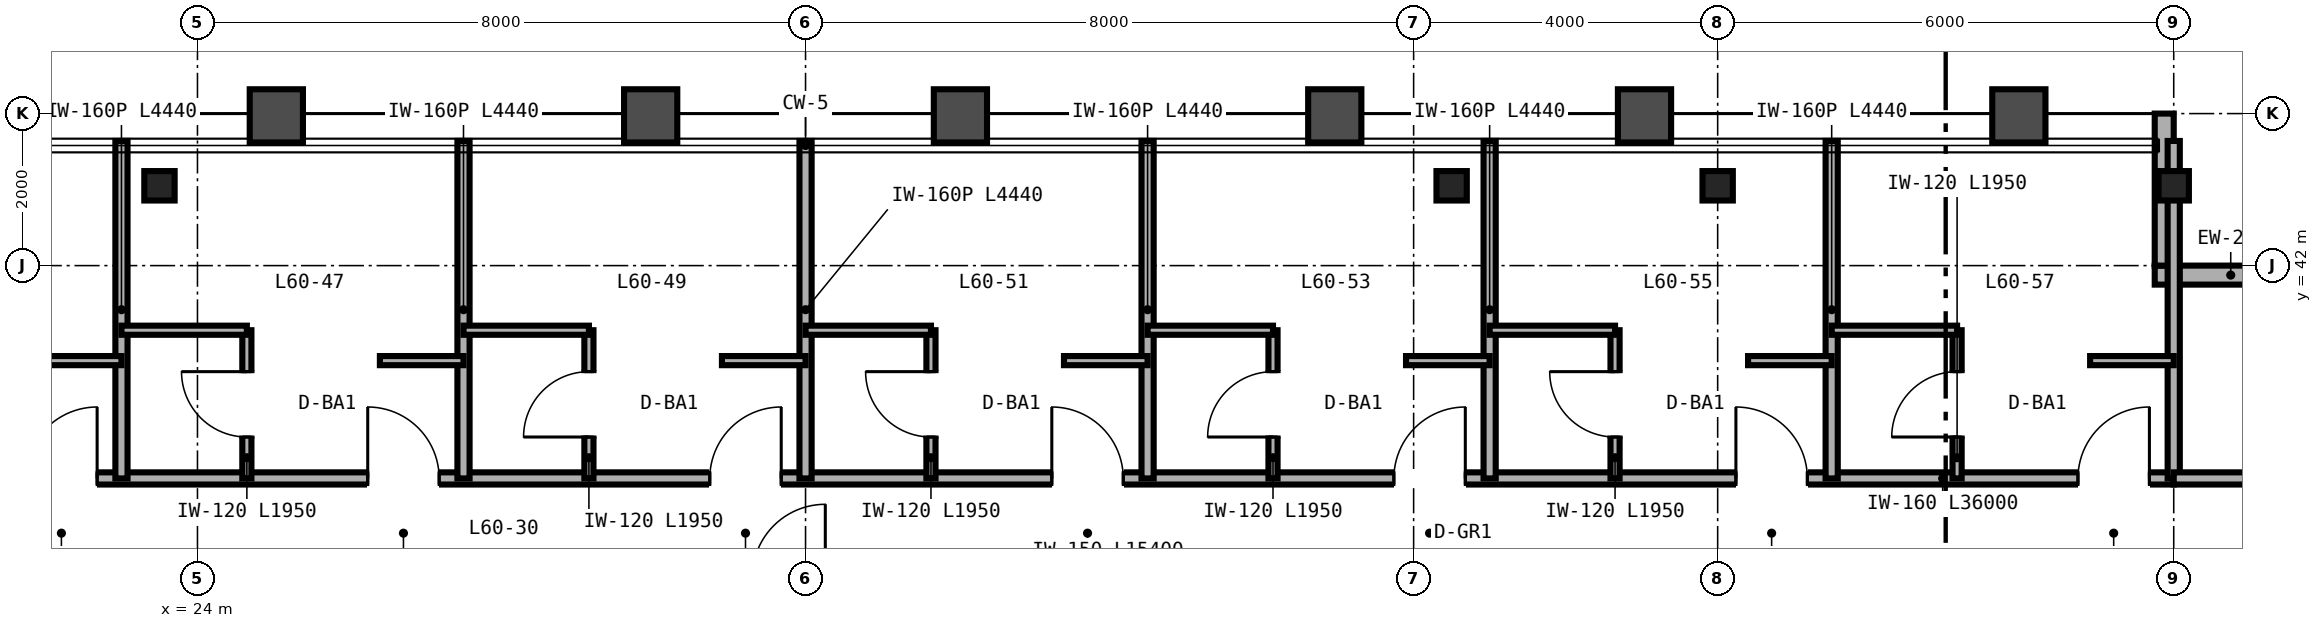
"""IFC4 building model, lengths in metres.
Left out: names, types, materials, properties, quantities, classifications, styles, units other than length and angle.
Written with IfcOpenShell. Run it as: python <this file> out.ifc"""

import sys

from ifc_helpers import new_model, si_unit, direction, frame, frame_2d, origin, origin_2d, place, context, subcontext, project, spatial, rectangle, i_section, extrude, source, transform, mapped, element, fill, save


model = new_model("IFC4")
c1 = context("Model", 3, precision=1e-05, world=origin(), true_north=direction((0.0, 1.0)))
c2 = subcontext(c1, "Body", "Model", "MODEL_VIEW")
j1 = project(units=[si_unit("LENGTHUNIT", "METRE"), si_unit("PLANEANGLEUNIT", "RADIAN")], contexts=[c1])
p1 = place(None, origin())
s1 = spatial("IfcSite", under=j1, at=p1, CompositionType="ELEMENT")
p2 = place(p1, origin())
s2 = spatial("IfcBuilding", under=s1, at=p2, CompositionType="ELEMENT")
p3 = place(p2, frame((0.0, 0.0, 240.0)))
s3 = spatial("IfcBuildingStorey", under=s2, at=p3, CompositionType="ELEMENT", Elevation=240.0)
m1 = source(origin(), c2, "Body", "SweptSolid", [
    extrude(i_section(OverallWidth=0.399, OverallDepth=0.387, WebThickness=0.021, FlangeThickness=0.033, FilletRadius=0.025, at=origin_2d()), origin(), (0.0, 0.0, 1.0), 3.38),
])
for number, where, z_axis, x_axis in (
    (1, (23.5, 43.05, 0.0), (0.0, 0.0, 1.0), (1.0, 0.0, 0.0)),
    (2, (40.5, 43.05, 0.0), (0.0, 0.0, 1.0), (1.0, 0.0, 0.0)),
    (3, (44.0, 43.05, 0.0), (0.0, 0.0, 1.0), (1.0, 0.0, 0.0)),
    (4, (50.0, 43.05, 0.0), (0.0, 0.0, 1.0), (1.0, 0.0, 0.0)),
):
    element("IfcColumn", number, at=place(p3, frame(where, z_axis=z_axis, x_axis=x_axis)), inside=s3, PredefinedType="COLUMN", context=c2, shape_type="MappedRepresentation", body=[
        mapped(m1, transform((0.0, 0.0, 0.0), scale=1.0)),
    ])
p4 = place(p3, frame((51.75, 41.875, 0.0), z_axis=(0.0, 0.0, 1.0), x_axis=(-1.0, 0.0, 0.0)))
e5 = element("IfcWall", 5, at=p4, inside=s3, PredefinedType="SOLIDWALL", context=c2, shape_type="SweptSolid", body=[
    extrude(rectangle(XDim=2.0, YDim=0.25, at=frame_2d((1.0, 0.0))), origin(), (0.0, 0.0, 1.0), 3.38),
])
p5 = place(p3, frame((49.875, 42.0, 0.0), z_axis=(0.0, 0.0, 1.0), x_axis=(0.0, 1.0, 0.0)))
e6 = element("IfcWall", 6, at=p5, inside=s3, PredefinedType="SOLIDWALL", context=c2, shape_type="SweptSolid", body=[
    extrude(rectangle(XDim=2.0, YDim=0.25, at=frame_2d((1.0, 0.0))), origin(), (0.0, 0.0, 1.0), 2.687),
])
p6 = place(p3, frame((14.0, 39.2, 0.0), z_axis=(0.0, 0.0, 1.0), x_axis=(1.0, 0.0, 0.0)))
e7 = element("IfcWall", 7, at=p6, inside=s3, PredefinedType="PARTITIONING", context=c2, shape_type="SweptSolid", body=[
    extrude(rectangle(XDim=36.0, YDim=0.16, at=frame_2d((18.0, 0.0))), origin(), (0.0, 0.0, 1.0), 2.923),
])
p7 = place(p6, frame((3.24, 0.0, 0.0)))
e8 = element("IfcOpeningElement", 8, at=p7, cuts=e7, PredefinedType="OPENING", context=c2, shape_type="SweptSolid", body=[
    extrude(rectangle(XDim=0.94, YDim=2.15, at=frame_2d((0.47, 1.075))), frame((0.0, 0.09, 0.0), z_axis=(0.0, -1.0, 0.0), x_axis=(1.0, 0.0, 0.0)), (0.0, 0.0, 1.0), 0.18),
])
p8 = place(p6, frame((7.74, 0.0, 0.0)))
e9 = element("IfcOpeningElement", 9, at=p8, cuts=e7, PredefinedType="OPENING", context=c2, shape_type="SweptSolid", body=[
    extrude(rectangle(XDim=0.94, YDim=2.15, at=frame_2d((0.47, 1.075))), frame((0.0, 0.09, 0.0), z_axis=(0.0, -1.0, 0.0), x_axis=(1.0, 0.0, 0.0)), (0.0, 0.0, 1.0), 0.18),
])
p9 = place(p6, frame((12.24, 0.0, 0.0)))
e10 = element("IfcOpeningElement", 10, at=p9, cuts=e7, PredefinedType="OPENING", context=c2, shape_type="SweptSolid", body=[
    extrude(rectangle(XDim=0.94, YDim=2.15, at=frame_2d((0.47, 1.075))), frame((0.0, 0.09, 0.0), z_axis=(0.0, -1.0, 0.0), x_axis=(1.0, 0.0, 0.0)), (0.0, 0.0, 1.0), 0.18),
])
p10 = place(p6, frame((16.74, 0.0, 0.0)))
e11 = element("IfcOpeningElement", 11, at=p10, cuts=e7, PredefinedType="OPENING", context=c2, shape_type="SweptSolid", body=[
    extrude(rectangle(XDim=0.94, YDim=2.15, at=frame_2d((0.47, 1.075))), frame((0.0, 0.09, 0.0), z_axis=(0.0, -1.0, 0.0), x_axis=(1.0, 0.0, 0.0)), (0.0, 0.0, 1.0), 0.18),
])
p11 = place(p6, frame((21.24, 0.0, 0.0)))
e12 = element("IfcOpeningElement", 12, at=p11, cuts=e7, PredefinedType="OPENING", context=c2, shape_type="SweptSolid", body=[
    extrude(rectangle(XDim=0.94, YDim=2.15, at=frame_2d((0.47, 1.075))), frame((0.0, 0.09, 0.0), z_axis=(0.0, -1.0, 0.0), x_axis=(1.0, 0.0, 0.0)), (0.0, 0.0, 1.0), 0.18),
])
p12 = place(p6, frame((25.74, 0.0, 0.0)))
e13 = element("IfcOpeningElement", 13, at=p12, cuts=e7, PredefinedType="OPENING", context=c2, shape_type="SweptSolid", body=[
    extrude(rectangle(XDim=0.94, YDim=2.15, at=frame_2d((0.47, 1.075))), frame((0.0, 0.09, 0.0), z_axis=(0.0, -1.0, 0.0), x_axis=(1.0, 0.0, 0.0)), (0.0, 0.0, 1.0), 0.18),
])
p13 = place(p6, frame((30.24, 0.0, 0.0)))
e14 = element("IfcOpeningElement", 14, at=p13, cuts=e7, PredefinedType="OPENING", context=c2, shape_type="SweptSolid", body=[
    extrude(rectangle(XDim=0.94, YDim=2.15, at=frame_2d((0.47, 1.075))), frame((0.0, 0.09, 0.0), z_axis=(0.0, -1.0, 0.0), x_axis=(1.0, 0.0, 0.0)), (0.0, 0.0, 1.0), 0.18),
])
p14 = place(p6, frame((34.74, 0.0, 0.0)))
e15 = element("IfcOpeningElement", 15, at=p14, cuts=e7, PredefinedType="OPENING", context=c2, shape_type="SweptSolid", body=[
    extrude(rectangle(XDim=0.94, YDim=2.15, at=frame_2d((0.47, 1.075))), frame((0.0, 0.09, 0.0), z_axis=(0.0, -1.0, 0.0), x_axis=(1.0, 0.0, 0.0)), (0.0, 0.0, 1.0), 0.18),
])
p15 = place(p3, frame((50.0, 39.2, 0.0), z_axis=(0.0, 0.0, 1.0), x_axis=(0.0, 1.0, 0.0)))
e16 = element("IfcWall", 16, at=p15, inside=s3, PredefinedType="PARTITIONING", context=c2, shape_type="SweptSolid", body=[
    extrude(rectangle(XDim=4.44, YDim=0.16, at=frame_2d((2.22, 0.0))), origin(), (0.0, 0.0, 1.0), 2.687),
])
p16 = place(p3, frame((23.0, 39.2, 0.0), z_axis=(0.0, 0.0, 1.0), x_axis=(0.0, 1.0, 0.0)))
e17 = element("IfcWall", 17, at=p16, inside=s3, PredefinedType="PARTITIONING", context=c2, shape_type="SweptSolid", body=[
    extrude(rectangle(XDim=4.44, YDim=0.16, at=frame_2d((2.22, 0.0))), origin(), (0.0, 0.0, 1.0), 2.843),
])
p17 = place(p3, frame((21.9, 40.75, 0.0), z_axis=(0.0, 0.0, 1.0), x_axis=(1.0, 0.0, 0.0)))
e18 = element("IfcWall", 18, at=p17, inside=s3, PredefinedType="PARTITIONING", context=c2, shape_type="SweptSolid", body=[
    extrude(rectangle(XDim=1.1, YDim=0.12, at=frame_2d((0.55, 0.0))), origin(), (0.0, 0.0, 1.0), 3.38),
])
p18 = place(p3, frame((27.5, 39.2, 0.0), z_axis=(0.0, 0.0, 1.0), x_axis=(0.0, 1.0, 0.0)))
e19 = element("IfcWall", 19, at=p18, inside=s3, PredefinedType="PARTITIONING", context=c2, shape_type="SweptSolid", body=[
    extrude(rectangle(XDim=4.44, YDim=0.16, at=frame_2d((2.22, 0.0))), origin(), (0.0, 0.0, 1.0), 2.453),
])
p19 = place(p3, frame((24.65, 39.2, 0.0), z_axis=(0.0, 0.0, 1.0), x_axis=(0.0, 1.0, 0.0)))
e20 = element("IfcWall", 20, at=p19, inside=s3, PredefinedType="PARTITIONING", context=c2, shape_type="SweptSolid", body=[
    extrude(rectangle(XDim=1.95, YDim=0.12, at=frame_2d((0.975, 0.0))), origin(), (0.0, 0.0, 1.0), 3.38),
])
p20 = place(p19, frame((0.545, 0.0, 0.0)))
e21 = element("IfcOpeningElement", 21, at=p20, cuts=e20, PredefinedType="OPENING", context=c2, shape_type="SweptSolid", body=[
    extrude(rectangle(XDim=0.86, YDim=2.1, at=frame_2d((0.43, 1.05))), frame((0.0, 0.07, 0.0), z_axis=(0.0, -1.0, 0.0), x_axis=(1.0, 0.0, 0.0)), (0.0, 0.0, 1.0), 0.14),
])
p21 = place(p3, frame((23.0, 41.15, 0.0), z_axis=(0.0, 0.0, 1.0), x_axis=(1.0, 0.0, 0.0)))
e22 = element("IfcWall", 22, at=p21, inside=s3, PredefinedType="PARTITIONING", context=c2, shape_type="SweptSolid", body=[
    extrude(rectangle(XDim=1.65, YDim=0.12, at=frame_2d((0.825, 0.0))), origin(), (0.0, 0.0, 1.0), 2.923),
])
p22 = place(p3, frame((26.4, 40.75, 0.0), z_axis=(0.0, 0.0, 1.0), x_axis=(1.0, 0.0, 0.0)))
e23 = element("IfcWall", 23, at=p22, inside=s3, PredefinedType="PARTITIONING", context=c2, shape_type="SweptSolid", body=[
    extrude(rectangle(XDim=1.1, YDim=0.12, at=frame_2d((0.55, 0.0))), origin(), (0.0, 0.0, 1.0), 3.38),
])
p23 = place(p3, frame((32.0, 39.2, 0.0), z_axis=(0.0, 0.0, 1.0), x_axis=(0.0, 1.0, 0.0)))
e24 = element("IfcWall", 24, at=p23, inside=s3, PredefinedType="PARTITIONING", context=c2, shape_type="SweptSolid", body=[
    extrude(rectangle(XDim=4.44, YDim=0.16, at=frame_2d((2.22, 0.0))), origin(), (0.0, 0.0, 1.0), 2.453),
])
p24 = place(p3, frame((29.15, 39.2, 0.0), z_axis=(0.0, 0.0, 1.0), x_axis=(0.0, 1.0, 0.0)))
e25 = element("IfcWall", 25, at=p24, inside=s3, PredefinedType="PARTITIONING", context=c2, shape_type="SweptSolid", body=[
    extrude(rectangle(XDim=1.95, YDim=0.12, at=frame_2d((0.975, 0.0))), origin(), (0.0, 0.0, 1.0), 3.38),
])
p25 = place(p24, frame((0.545, 0.0, 0.0)))
e26 = element("IfcOpeningElement", 26, at=p25, cuts=e25, PredefinedType="OPENING", context=c2, shape_type="SweptSolid", body=[
    extrude(rectangle(XDim=0.86, YDim=2.1, at=frame_2d((0.43, 1.05))), frame((0.0, 0.07, 0.0), z_axis=(0.0, -1.0, 0.0), x_axis=(1.0, 0.0, 0.0)), (0.0, 0.0, 1.0), 0.14),
])
p26 = place(p3, frame((27.5, 41.15, 0.0), z_axis=(0.0, 0.0, 1.0), x_axis=(1.0, 0.0, 0.0)))
e27 = element("IfcWall", 27, at=p26, inside=s3, PredefinedType="PARTITIONING", context=c2, shape_type="SweptSolid", body=[
    extrude(rectangle(XDim=1.65, YDim=0.12, at=frame_2d((0.825, 0.0))), origin(), (0.0, 0.0, 1.0), 3.38),
])
p27 = place(p3, frame((30.9, 40.75, 0.0), z_axis=(0.0, 0.0, 1.0), x_axis=(1.0, 0.0, 0.0)))
e28 = element("IfcWall", 28, at=p27, inside=s3, PredefinedType="PARTITIONING", context=c2, shape_type="SweptSolid", body=[
    extrude(rectangle(XDim=1.1, YDim=0.12, at=frame_2d((0.55, 0.0))), origin(), (0.0, 0.0, 1.0), 3.38),
])
p28 = place(p3, frame((36.5, 39.2, 0.0), z_axis=(0.0, 0.0, 1.0), x_axis=(0.0, 1.0, 0.0)))
e29 = element("IfcWall", 29, at=p28, inside=s3, PredefinedType="PARTITIONING", context=c2, shape_type="SweptSolid", body=[
    extrude(rectangle(XDim=4.44, YDim=0.16, at=frame_2d((2.22, 0.0))), origin(), (0.0, 0.0, 1.0), 2.453),
])
p29 = place(p3, frame((33.65, 39.2, 0.0), z_axis=(0.0, 0.0, 1.0), x_axis=(0.0, 1.0, 0.0)))
e30 = element("IfcWall", 30, at=p29, inside=s3, PredefinedType="PARTITIONING", context=c2, shape_type="SweptSolid", body=[
    extrude(rectangle(XDim=1.95, YDim=0.12, at=frame_2d((0.975, 0.0))), origin(), (0.0, 0.0, 1.0), 3.38),
])
p30 = place(p29, frame((0.545, 0.0, 0.0)))
e31 = element("IfcOpeningElement", 31, at=p30, cuts=e30, PredefinedType="OPENING", context=c2, shape_type="SweptSolid", body=[
    extrude(rectangle(XDim=0.86, YDim=2.1, at=frame_2d((0.43, 1.05))), frame((0.0, 0.07, 0.0), z_axis=(0.0, -1.0, 0.0), x_axis=(1.0, 0.0, 0.0)), (0.0, 0.0, 1.0), 0.14),
])
p31 = place(p3, frame((32.0, 41.15, 0.0), z_axis=(0.0, 0.0, 1.0), x_axis=(1.0, 0.0, 0.0)))
e32 = element("IfcWall", 32, at=p31, inside=s3, PredefinedType="PARTITIONING", context=c2, shape_type="SweptSolid", body=[
    extrude(rectangle(XDim=1.65, YDim=0.12, at=frame_2d((0.825, 0.0))), origin(), (0.0, 0.0, 1.0), 3.38),
])
p32 = place(p3, frame((35.4, 40.75, 0.0), z_axis=(0.0, 0.0, 1.0), x_axis=(1.0, 0.0, 0.0)))
e33 = element("IfcWall", 33, at=p32, inside=s3, PredefinedType="PARTITIONING", context=c2, shape_type="SweptSolid", body=[
    extrude(rectangle(XDim=1.1, YDim=0.12, at=frame_2d((0.55, 0.0))), origin(), (0.0, 0.0, 1.0), 3.38),
])
p33 = place(p3, frame((41.0, 39.2, 0.0), z_axis=(0.0, 0.0, 1.0), x_axis=(0.0, 1.0, 0.0)))
e34 = element("IfcWall", 34, at=p33, inside=s3, PredefinedType="PARTITIONING", context=c2, shape_type="SweptSolid", body=[
    extrude(rectangle(XDim=4.44, YDim=0.16, at=frame_2d((2.22, 0.0))), origin(), (0.0, 0.0, 1.0), 2.843),
])
p34 = place(p3, frame((38.15, 39.2, 0.0), z_axis=(0.0, 0.0, 1.0), x_axis=(0.0, 1.0, 0.0)))
e35 = element("IfcWall", 35, at=p34, inside=s3, PredefinedType="PARTITIONING", context=c2, shape_type="SweptSolid", body=[
    extrude(rectangle(XDim=1.95, YDim=0.12, at=frame_2d((0.975, 0.0))), origin(), (0.0, 0.0, 1.0), 3.38),
])
p35 = place(p34, frame((0.545, 0.0, 0.0)))
e36 = element("IfcOpeningElement", 36, at=p35, cuts=e35, PredefinedType="OPENING", context=c2, shape_type="SweptSolid", body=[
    extrude(rectangle(XDim=0.86, YDim=2.1, at=frame_2d((0.43, 1.05))), frame((0.0, 0.07, 0.0), z_axis=(0.0, -1.0, 0.0), x_axis=(1.0, 0.0, 0.0)), (0.0, 0.0, 1.0), 0.14),
])
p36 = place(p3, frame((36.5, 41.15, 0.0), z_axis=(0.0, 0.0, 1.0), x_axis=(1.0, 0.0, 0.0)))
e37 = element("IfcWall", 37, at=p36, inside=s3, PredefinedType="PARTITIONING", context=c2, shape_type="SweptSolid", body=[
    extrude(rectangle(XDim=1.65, YDim=0.12, at=frame_2d((0.825, 0.0))), origin(), (0.0, 0.0, 1.0), 3.38),
])
p37 = place(p3, frame((39.9, 40.75, 0.0), z_axis=(0.0, 0.0, 1.0), x_axis=(1.0, 0.0, 0.0)))
e38 = element("IfcWall", 38, at=p37, inside=s3, PredefinedType="PARTITIONING", context=c2, shape_type="SweptSolid", body=[
    extrude(rectangle(XDim=1.1, YDim=0.12, at=frame_2d((0.55, 0.0))), origin(), (0.0, 0.0, 1.0), 2.923),
])
p38 = place(p3, frame((45.5, 39.2, 0.0), z_axis=(0.0, 0.0, 1.0), x_axis=(0.0, 1.0, 0.0)))
e39 = element("IfcWall", 39, at=p38, inside=s3, PredefinedType="PARTITIONING", context=c2, shape_type="SweptSolid", body=[
    extrude(rectangle(XDim=4.44, YDim=0.16, at=frame_2d((2.22, 0.0))), origin(), (0.0, 0.0, 1.0), 2.687),
])
p39 = place(p3, frame((42.65, 39.2, 0.0), z_axis=(0.0, 0.0, 1.0), x_axis=(0.0, 1.0, 0.0)))
e40 = element("IfcWall", 40, at=p39, inside=s3, PredefinedType="PARTITIONING", context=c2, shape_type="SweptSolid", body=[
    extrude(rectangle(XDim=1.95, YDim=0.12, at=frame_2d((0.975, 0.0))), origin(), (0.0, 0.0, 1.0), 3.38),
])
p40 = place(p39, frame((0.545, 0.0, 0.0)))
e41 = element("IfcOpeningElement", 41, at=p40, cuts=e40, PredefinedType="OPENING", context=c2, shape_type="SweptSolid", body=[
    extrude(rectangle(XDim=0.86, YDim=2.1, at=frame_2d((0.43, 1.05))), frame((0.0, 0.07, 0.0), z_axis=(0.0, -1.0, 0.0), x_axis=(1.0, 0.0, 0.0)), (0.0, 0.0, 1.0), 0.14),
])
p41 = place(p3, frame((41.0, 41.15, 0.0), z_axis=(0.0, 0.0, 1.0), x_axis=(1.0, 0.0, 0.0)))
e42 = element("IfcWall", 42, at=p41, inside=s3, PredefinedType="PARTITIONING", context=c2, shape_type="SweptSolid", body=[
    extrude(rectangle(XDim=1.65, YDim=0.12, at=frame_2d((0.825, 0.0))), origin(), (0.0, 0.0, 1.0), 3.38),
])
p42 = place(p3, frame((44.4, 40.75, 0.0), z_axis=(0.0, 0.0, 1.0), x_axis=(1.0, 0.0, 0.0)))
e43 = element("IfcWall", 43, at=p42, inside=s3, PredefinedType="PARTITIONING", context=c2, shape_type="SweptSolid", body=[
    extrude(rectangle(XDim=1.1, YDim=0.12, at=frame_2d((0.55, 0.0))), origin(), (0.0, 0.0, 1.0), 3.38),
])
p43 = place(p3, frame((47.15, 39.2, 0.0), z_axis=(0.0, 0.0, 1.0), x_axis=(0.0, 1.0, 0.0)))
e44 = element("IfcWall", 44, at=p43, inside=s3, PredefinedType="PARTITIONING", context=c2, shape_type="SweptSolid", body=[
    extrude(rectangle(XDim=1.95, YDim=0.12, at=frame_2d((0.975, 0.0))), origin(), (0.0, 0.0, 1.0), 3.38),
])
p44 = place(p43, frame((0.545, 0.0, 0.0)))
e45 = element("IfcOpeningElement", 45, at=p44, cuts=e44, PredefinedType="OPENING", context=c2, shape_type="SweptSolid", body=[
    extrude(rectangle(XDim=0.86, YDim=2.1, at=frame_2d((0.43, 1.05))), frame((0.0, 0.07, 0.0), z_axis=(0.0, -1.0, 0.0), x_axis=(1.0, 0.0, 0.0)), (0.0, 0.0, 1.0), 0.14),
])
p45 = place(p3, frame((45.5, 41.15, 0.0), z_axis=(0.0, 0.0, 1.0), x_axis=(1.0, 0.0, 0.0)))
e46 = element("IfcWall", 46, at=p45, inside=s3, PredefinedType="PARTITIONING", context=c2, shape_type="SweptSolid", body=[
    extrude(rectangle(XDim=1.65, YDim=0.12, at=frame_2d((0.825, 0.0))), origin(), (0.0, 0.0, 1.0), 3.38),
])
p46 = place(p3, frame((48.9, 40.75, 0.0), z_axis=(0.0, 0.0, 1.0), x_axis=(1.0, 0.0, 0.0)))
e47 = element("IfcWall", 47, at=p46, inside=s3, PredefinedType="PARTITIONING", context=c2, shape_type="SweptSolid", body=[
    extrude(rectangle(XDim=1.1, YDim=0.12, at=frame_2d((0.55, 0.0))), origin(), (0.0, 0.0, 1.0), 3.38),
])
p47 = place(p3, frame((50.0, 39.2, 0.0), z_axis=(0.0, 0.0, 1.0), x_axis=(1.0, 0.0, 0.0)))
e48 = element("IfcWall", 48, at=p47, inside=s3, PredefinedType="PARTITIONING", context=c2, shape_type="SweptSolid", body=[
    extrude(rectangle(XDim=4.0, YDim=0.16, at=frame_2d((2.0, 0.0))), origin(), (0.0, 0.0, 1.0), 3.38),
])
p48 = place(p47, frame((1.52, 0.0, 0.0)))
e49 = element("IfcOpeningElement", 49, at=p48, cuts=e48, PredefinedType="OPENING", context=c2, shape_type="SweptSolid", body=[
    extrude(rectangle(XDim=0.96, YDim=2.15, at=frame_2d((0.48, 1.075))), frame((0.0, 0.09, 0.0), z_axis=(0.0, -1.0, 0.0), x_axis=(1.0, 0.0, 0.0)), (0.0, 0.0, 1.0), 0.18),
])
m2 = source(origin(), c2, "Body", "SweptSolid", [
    extrude(rectangle(XDim=0.86, YDim=2.1, at=frame_2d((0.43, 1.05))), frame((0.0, 0.025, 0.0), z_axis=(0.0, -1.0, 0.0), x_axis=(1.0, 0.0, 0.0)), (0.0, 0.0, 1.0), 0.05),
])
p49 = place(p20, origin())
e50 = element("IfcDoor", 50, at=p49, inside=s3, OperationType="SINGLE_SWING_RIGHT", PredefinedType="DOOR", context=c2, shape_type="MappedRepresentation", body=[
    mapped(m2, transform((0.0, 0.0, 0.0), scale=1.0)),
])
fill(e21, e50)
p50 = place(p25, origin())
e51 = element("IfcDoor", 51, at=p50, inside=s3, OperationType="SINGLE_SWING_LEFT", PredefinedType="DOOR", context=c2, shape_type="MappedRepresentation", body=[
    mapped(m2, transform((0.0, 0.0, 0.0), scale=1.0)),
])
fill(e26, e51)
p51 = place(p30, origin())
e52 = element("IfcDoor", 52, at=p51, inside=s3, OperationType="SINGLE_SWING_RIGHT", PredefinedType="DOOR", context=c2, shape_type="MappedRepresentation", body=[
    mapped(m2, transform((0.0, 0.0, 0.0), scale=1.0)),
])
fill(e31, e52)
p52 = place(p35, origin())
e53 = element("IfcDoor", 53, at=p52, inside=s3, OperationType="SINGLE_SWING_LEFT", PredefinedType="DOOR", context=c2, shape_type="MappedRepresentation", body=[
    mapped(m2, transform((0.0, 0.0, 0.0), scale=1.0)),
])
fill(e36, e53)
p53 = place(p40, origin())
e54 = element("IfcDoor", 54, at=p53, inside=s3, OperationType="SINGLE_SWING_RIGHT", PredefinedType="DOOR", context=c2, shape_type="MappedRepresentation", body=[
    mapped(m2, transform((0.0, 0.0, 0.0), scale=1.0)),
])
fill(e41, e54)
p54 = place(p44, origin())
e55 = element("IfcDoor", 55, at=p54, inside=s3, OperationType="SINGLE_SWING_LEFT", PredefinedType="DOOR", context=c2, shape_type="MappedRepresentation", body=[
    mapped(m2, transform((0.0, 0.0, 0.0), scale=1.0)),
])
fill(e45, e55)
m3 = source(origin(), c2, "Body", "SweptSolid", [
    extrude(rectangle(XDim=0.94, YDim=2.15, at=frame_2d((0.47, 1.075))), frame((0.0, 0.025, 0.0), z_axis=(0.0, -1.0, 0.0), x_axis=(1.0, 0.0, 0.0)), (0.0, 0.0, 1.0), 0.05),
])
p55 = place(p8, origin())
e56 = element("IfcDoor", 56, at=p55, inside=s3, OperationType="SINGLE_SWING_RIGHT", PredefinedType="DOOR", context=c2, shape_type="MappedRepresentation", body=[
    mapped(m3, transform((0.0, 0.0, 0.0), scale=1.0)),
])
fill(e9, e56)
p56 = place(p9, origin())
e57 = element("IfcDoor", 57, at=p56, inside=s3, OperationType="SINGLE_SWING_LEFT", PredefinedType="DOOR", context=c2, shape_type="MappedRepresentation", body=[
    mapped(m3, transform((0.0, 0.0, 0.0), scale=1.0)),
])
fill(e10, e57)
p57 = place(p10, origin())
e58 = element("IfcDoor", 58, at=p57, inside=s3, OperationType="SINGLE_SWING_RIGHT", PredefinedType="DOOR", context=c2, shape_type="MappedRepresentation", body=[
    mapped(m3, transform((0.0, 0.0, 0.0), scale=1.0)),
])
fill(e11, e58)
p58 = place(p11, origin())
e59 = element("IfcDoor", 59, at=p58, inside=s3, OperationType="SINGLE_SWING_LEFT", PredefinedType="DOOR", context=c2, shape_type="MappedRepresentation", body=[
    mapped(m3, transform((0.0, 0.0, 0.0), scale=1.0)),
])
fill(e12, e59)
p59 = place(p12, origin())
e60 = element("IfcDoor", 60, at=p59, inside=s3, OperationType="SINGLE_SWING_RIGHT", PredefinedType="DOOR", context=c2, shape_type="MappedRepresentation", body=[
    mapped(m3, transform((0.0, 0.0, 0.0), scale=1.0)),
])
fill(e13, e60)
p60 = place(p13, origin())
e61 = element("IfcDoor", 61, at=p60, inside=s3, OperationType="SINGLE_SWING_LEFT", PredefinedType="DOOR", context=c2, shape_type="MappedRepresentation", body=[
    mapped(m3, transform((0.0, 0.0, 0.0), scale=1.0)),
])
fill(e14, e61)
p61 = place(p14, origin())
e62 = element("IfcDoor", 62, at=p61, inside=s3, OperationType="SINGLE_SWING_RIGHT", PredefinedType="DOOR", context=c2, shape_type="MappedRepresentation", body=[
    mapped(m3, transform((0.0, 0.0, 0.0), scale=1.0)),
])
fill(e15, e62)
save(model, sys.argv[1])
